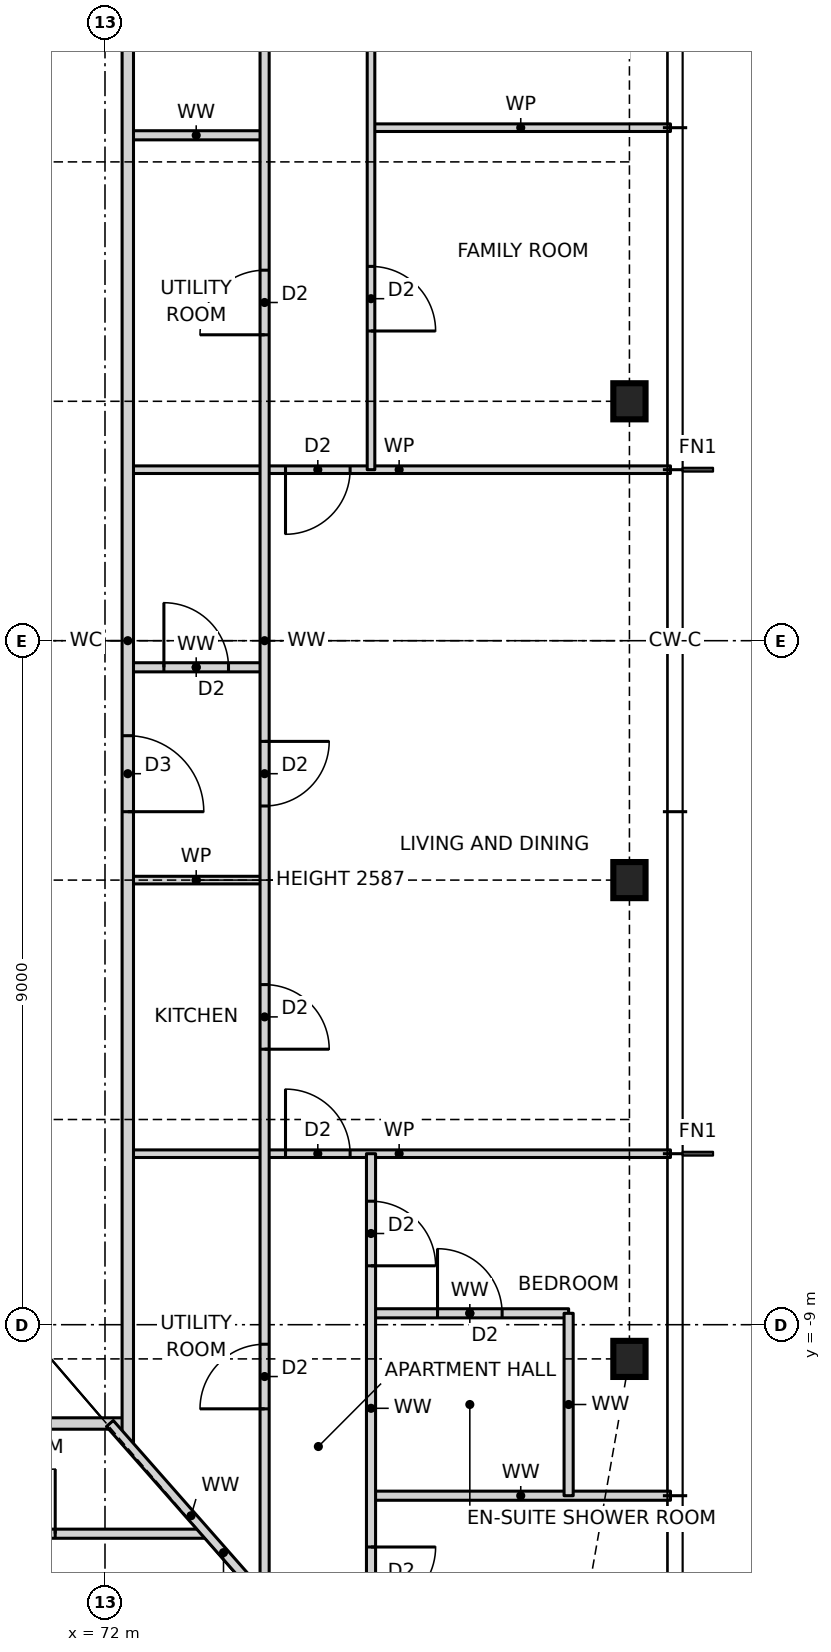
"""IFC4 building model, lengths in metres.
Left out: names, types, materials, properties, quantities, classifications, styles, units other than length and angle.
Written with IfcOpenShell. Run it as: python <this file> out.ifc"""

import sys

from ifc_helpers import new_model, si_unit, direction, frame, frame_2d, origin, origin_2d, place, context, subcontext, project, spatial, rectangle, i_section, extrude, element, fill, save


model = new_model("IFC4")
c1 = context("Model", 3, precision=1e-05, world=origin(), true_north=direction((0.0, 1.0)))
c2 = subcontext(c1, "Body", "Model", "MODEL_VIEW")
j1 = project(units=[si_unit("LENGTHUNIT", "METRE"), si_unit("PLANEANGLEUNIT", "RADIAN")], contexts=[c1])
p1 = place(None, origin())
s1 = spatial("IfcSite", under=j1, at=p1, CompositionType="ELEMENT")
p2 = place(p1, origin())
s2 = spatial("IfcBuilding", under=s1, at=p2, CompositionType="ELEMENT")
p3 = place(p2, frame((0.0, 0.0, 25.5)))
s3 = spatial("IfcBuildingStorey", under=s2, at=p3, CompositionType="ELEMENT", Elevation=25.5)
for number, where, z_axis, x_axis in (
    (1, (78.9, -9.45, 0.0), (0.0, 0.0, 1.0), (1.0, 0.0, 0.0)),
    (2, (78.9, -3.15, 0.0), (0.0, 0.0, 1.0), (1.0, 0.0, 0.0)),
    (3, (78.9, 3.15, 0.0), (0.0, 0.0, 1.0), (1.0, 0.0, 0.0)),
):
    element("IfcColumn", number, at=place(p3, frame(where, z_axis=z_axis, x_axis=x_axis)), inside=s3, PredefinedType="COLUMN", context=c2, shape_type="SweptSolid", body=[
        extrude(i_section(OverallWidth=0.424, OverallDepth=0.475, WebThickness=0.048, FlangeThickness=0.077, at=origin_2d()), origin(), (0.0, 0.0, 1.0), 3.5),
    ])
p4 = place(p3, frame((54.0, -11.75, 0.0), z_axis=(0.0, 0.0, 1.0), x_axis=(1.0, 0.0, 0.0)))
e4 = element("IfcWall", 4, at=p4, inside=s3, PredefinedType="PARTITIONING", context=c2, shape_type="SweptSolid", body=[
    extrude(rectangle(XDim=19.34, YDim=0.12, at=frame_2d((9.67, 0.0))), origin(), (0.0, 0.0, 1.0), 3.27),
])
p5 = place(p4, frame((1.375, 0.0, 0.0)))
e5 = element("IfcOpeningElement", 5, at=p5, cuts=e4, PredefinedType="OPENING", context=c2, shape_type="SweptSolid", body=[
    extrude(rectangle(XDim=0.85, YDim=2.1, at=frame_2d((0.425, 1.05))), frame((0.0, 0.07, 0.0), z_axis=(0.0, -1.0, 0.0), x_axis=(1.0, 0.0, 0.0)), (0.0, 0.0, 1.0), 0.14),
])
p6 = place(p4, frame((4.575, 0.0, 0.0)))
e6 = element("IfcOpeningElement", 6, at=p6, cuts=e4, PredefinedType="OPENING", context=c2, shape_type="SweptSolid", body=[
    extrude(rectangle(XDim=0.85, YDim=2.1, at=frame_2d((0.425, 1.05))), frame((0.0, 0.07, 0.0), z_axis=(0.0, -1.0, 0.0), x_axis=(1.0, 0.0, 0.0)), (0.0, 0.0, 1.0), 0.14),
])
p7 = place(p4, frame((11.325, 0.0, 0.0)))
e7 = element("IfcOpeningElement", 7, at=p7, cuts=e4, PredefinedType="OPENING", context=c2, shape_type="SweptSolid", body=[
    extrude(rectangle(XDim=0.85, YDim=2.1, at=frame_2d((0.425, 1.05))), frame((0.0, 0.07, 0.0), z_axis=(0.0, -1.0, 0.0), x_axis=(1.0, 0.0, 0.0)), (0.0, 0.0, 1.0), 0.14),
])
p8 = place(p4, frame((16.495, 0.0, 0.0)))
e8 = element("IfcOpeningElement", 8, at=p8, cuts=e4, PredefinedType="OPENING", context=c2, shape_type="SweptSolid", body=[
    extrude(rectangle(XDim=0.85, YDim=2.1, at=frame_2d((0.425, 1.05))), frame((0.0, 0.07, 0.0), z_axis=(0.0, -1.0, 0.0), x_axis=(1.0, 0.0, 0.0)), (0.0, 0.0, 1.0), 0.14),
])
p9 = place(p3, frame((75.5, -11.25, 0.0), z_axis=(0.0, 0.0, 1.0), x_axis=(1.0, 0.0, 0.0)))
e9 = element("IfcWall", 9, at=p9, inside=s3, PredefinedType="PARTITIONING", context=c2, shape_type="SweptSolid", body=[
    extrude(rectangle(XDim=3.94, YDim=0.12, at=frame_2d((1.97, 0.0))), origin(), (0.0, 0.0, 1.0), 3.27),
])
p10 = place(p3, frame((53.7, -10.3, 0.0), z_axis=(0.0, 0.0, 1.0), x_axis=(1.0, 0.0, 0.0)))
e10 = element("IfcWall", 10, at=p10, inside=s3, PredefinedType="PARTITIONING", context=c2, shape_type="SweptSolid", body=[
    extrude(rectangle(XDim=18.6, YDim=0.15, at=frame_2d((9.3, 0.0))), origin(), (0.0, 0.0, 1.0), 3.27),
])
p11 = place(p10, frame((4.8, 0.0, 0.0)))
e11 = element("IfcOpeningElement", 11, at=p11, cuts=e10, PredefinedType="OPENING", context=c2, shape_type="SweptSolid", body=[
    extrude(rectangle(XDim=1.0, YDim=2.1, at=frame_2d((0.5, 1.05))), frame((0.0, 0.085, 0.0), z_axis=(0.0, -1.0, 0.0), x_axis=(1.0, 0.0, 0.0)), (0.0, 0.0, 1.0), 0.17),
])
p12 = place(p3, frame((75.5, -8.85, 0.0), z_axis=(0.0, 0.0, 1.0), x_axis=(1.0, 0.0, 0.0)))
e12 = element("IfcWall", 12, at=p12, inside=s3, PredefinedType="PARTITIONING", context=c2, shape_type="SweptSolid", body=[
    extrude(rectangle(XDim=2.6, YDim=0.12, at=frame_2d((1.3, 0.0))), origin(), (0.0, 0.0, 1.0), 3.27),
])
p13 = place(p12, frame((0.875, 0.0, 0.0)))
e13 = element("IfcOpeningElement", 13, at=p13, cuts=e12, PredefinedType="OPENING", context=c2, shape_type="SweptSolid", body=[
    extrude(rectangle(XDim=0.85, YDim=2.1, at=frame_2d((0.425, 1.05))), frame((0.0, 0.07, 0.0), z_axis=(0.0, -1.0, 0.0), x_axis=(1.0, 0.0, 0.0)), (0.0, 0.0, 1.0), 0.14),
])
p14 = place(p3, frame((72.3, -6.75, 0.0), z_axis=(0.0, 0.0, 1.0), x_axis=(1.0, 0.0, 0.0)))
e14 = element("IfcWall", 14, at=p14, inside=s3, PredefinedType="PARTITIONING", context=c2, shape_type="SweptSolid", body=[
    extrude(rectangle(XDim=7.14, YDim=0.1, at=frame_2d((3.57, 0.0))), origin(), (0.0, 0.0, 1.0), 3.27),
])
p15 = place(p14, frame((2.075, 0.0, 0.0)))
e15 = element("IfcOpeningElement", 15, at=p15, cuts=e14, PredefinedType="OPENING", context=c2, shape_type="SweptSolid", body=[
    extrude(rectangle(XDim=0.85, YDim=2.1, at=frame_2d((0.425, 1.05))), frame((0.0, 0.06, 0.0), z_axis=(0.0, -1.0, 0.0), x_axis=(1.0, 0.0, 0.0)), (0.0, 0.0, 1.0), 0.12),
])
p16 = place(p3, frame((72.3, -3.15, 0.0), z_axis=(0.0, 0.0, 1.0), x_axis=(1.0, 0.0, 0.0)))
e16 = element("IfcWall", 16, at=p16, inside=s3, PredefinedType="PARTITIONING", context=c2, shape_type="SweptSolid", body=[
    extrude(rectangle(XDim=1.8, YDim=0.1, at=frame_2d((0.9, 0.0))), origin(), (0.0, 0.0, 1.0), 2.587),
])
p17 = place(p3, frame((72.3, -0.35, 0.0), z_axis=(0.0, 0.0, 1.0), x_axis=(1.0, 0.0, 0.0)))
e17 = element("IfcWall", 17, at=p17, inside=s3, PredefinedType="PARTITIONING", context=c2, shape_type="SweptSolid", body=[
    extrude(rectangle(XDim=1.8, YDim=0.12, at=frame_2d((0.9, 0.0))), origin(), (0.0, 0.0, 1.0), 3.27),
])
p18 = place(p17, frame((0.475, 0.0, 0.0)))
e18 = element("IfcOpeningElement", 18, at=p18, cuts=e17, PredefinedType="OPENING", context=c2, shape_type="SweptSolid", body=[
    extrude(rectangle(XDim=0.85, YDim=2.1, at=frame_2d((0.425, 1.05))), frame((0.0, 0.07, 0.0), z_axis=(0.0, -1.0, 0.0), x_axis=(1.0, 0.0, 0.0)), (0.0, 0.0, 1.0), 0.14),
])
p19 = place(p3, frame((72.3, 2.25, 0.0), z_axis=(0.0, 0.0, 1.0), x_axis=(1.0, 0.0, 0.0)))
e19 = element("IfcWall", 19, at=p19, inside=s3, PredefinedType="PARTITIONING", context=c2, shape_type="SweptSolid", body=[
    extrude(rectangle(XDim=7.14, YDim=0.1, at=frame_2d((3.57, 0.0))), origin(), (0.0, 0.0, 1.0), 3.27),
])
p20 = place(p19, frame((2.075, 0.0, 0.0)))
e20 = element("IfcOpeningElement", 20, at=p20, cuts=e19, PredefinedType="OPENING", context=c2, shape_type="SweptSolid", body=[
    extrude(rectangle(XDim=0.85, YDim=2.1, at=frame_2d((0.425, 1.05))), frame((0.0, 0.06, 0.0), z_axis=(0.0, -1.0, 0.0), x_axis=(1.0, 0.0, 0.0)), (0.0, 0.0, 1.0), 0.12),
])
p21 = place(p3, frame((72.3, 6.65, 0.0), z_axis=(0.0, 0.0, 1.0), x_axis=(1.0, 0.0, 0.0)))
e21 = element("IfcWall", 21, at=p21, inside=s3, PredefinedType="PARTITIONING", context=c2, shape_type="SweptSolid", body=[
    extrude(rectangle(XDim=1.8, YDim=0.12, at=frame_2d((0.9, 0.0))), origin(), (0.0, 0.0, 1.0), 3.27),
])
p22 = place(p3, frame((75.5, 6.75, 0.0), z_axis=(0.0, 0.0, 1.0), x_axis=(1.0, 0.0, 0.0)))
e22 = element("IfcWall", 22, at=p22, inside=s3, PredefinedType="PARTITIONING", context=c2, shape_type="SweptSolid", body=[
    extrude(rectangle(XDim=3.94, YDim=0.1, at=frame_2d((1.97, 0.0))), origin(), (0.0, 0.0, 1.0), 3.27),
])
p23 = place(p3, frame((78.1, -11.25, 0.0), z_axis=(0.0, 0.0, 1.0), x_axis=(0.0, 1.0, 0.0)))
e23 = element("IfcWall", 23, at=p23, inside=s3, PredefinedType="PARTITIONING", context=c2, shape_type="SweptSolid", body=[
    extrude(rectangle(XDim=2.4, YDim=0.12, at=frame_2d((1.2, 0.0))), origin(), (0.0, 0.0, 1.0), 3.27),
])
p24 = place(p3, frame((75.5, -13.45, 0.0), z_axis=(0.0, 0.0, 1.0), x_axis=(0.0, 1.0, 0.0)))
e24 = element("IfcWall", 24, at=p24, inside=s3, PredefinedType="PARTITIONING", context=c2, shape_type="SweptSolid", body=[
    extrude(rectangle(XDim=6.7, YDim=0.12, at=frame_2d((3.35, 0.0))), origin(), (0.0, 0.0, 1.0), 3.27),
])
p25 = place(p24, frame((5.225, 0.0, 0.0)))
e25 = element("IfcOpeningElement", 25, at=p25, cuts=e24, PredefinedType="OPENING", context=c2, shape_type="SweptSolid", body=[
    extrude(rectangle(XDim=0.85, YDim=2.1, at=frame_2d((0.425, 1.05))), frame((0.0, 0.07, 0.0), z_axis=(0.0, -1.0, 0.0), x_axis=(1.0, 0.0, 0.0)), (0.0, 0.0, 1.0), 0.14),
])
p26 = place(p24, frame((0.675, 0.0, 0.0)))
e26 = element("IfcOpeningElement", 26, at=p26, cuts=e24, PredefinedType="OPENING", context=c2, shape_type="SweptSolid", body=[
    extrude(rectangle(XDim=0.85, YDim=2.1, at=frame_2d((0.425, 1.05))), frame((0.0, 0.07, 0.0), z_axis=(0.0, -1.0, 0.0), x_axis=(1.0, 0.0, 0.0)), (0.0, 0.0, 1.0), 0.14),
])
p27 = place(p3, frame((75.5, 2.25, 0.0), z_axis=(0.0, 0.0, 1.0), x_axis=(0.0, 1.0, 0.0)))
e27 = element("IfcWall", 27, at=p27, inside=s3, PredefinedType="PARTITIONING", context=c2, shape_type="SweptSolid", body=[
    extrude(rectangle(XDim=11.2, YDim=0.1, at=frame_2d((5.6, 0.0))), origin(), (0.0, 0.0, 1.0), 3.27),
])
p28 = place(p27, frame((1.825, 0.0, 0.0)))
e28 = element("IfcOpeningElement", 28, at=p28, cuts=e27, PredefinedType="OPENING", context=c2, shape_type="SweptSolid", body=[
    extrude(rectangle(XDim=0.85, YDim=2.1, at=frame_2d((0.425, 1.05))), frame((0.0, 0.06, 0.0), z_axis=(0.0, -1.0, 0.0), x_axis=(1.0, 0.0, 0.0)), (0.0, 0.0, 1.0), 0.12),
])
p29 = place(p27, frame((6.325, 0.0, 0.0)))
e29 = element("IfcOpeningElement", 29, at=p29, cuts=e27, PredefinedType="OPENING", context=c2, shape_type="SweptSolid", body=[
    extrude(rectangle(XDim=0.85, YDim=2.1, at=frame_2d((0.425, 1.05))), frame((0.0, 0.06, 0.0), z_axis=(0.0, -1.0, 0.0), x_axis=(1.0, 0.0, 0.0)), (0.0, 0.0, 1.0), 0.12),
])
p30 = place(p27, frame((9.675, 0.0, 0.0)))
e30 = element("IfcOpeningElement", 30, at=p30, cuts=e27, PredefinedType="OPENING", context=c2, shape_type="SweptSolid", body=[
    extrude(rectangle(XDim=0.85, YDim=2.1, at=frame_2d((0.425, 1.05))), frame((0.0, 0.06, 0.0), z_axis=(0.0, -1.0, 0.0), x_axis=(1.0, 0.0, 0.0)), (0.0, 0.0, 1.0), 0.12),
])
p31 = place(p3, frame((74.1, -12.614, 0.0), z_axis=(0.0, 0.0, 1.0), x_axis=(0.0, 1.0, 0.0)))
e31 = element("IfcWall", 31, at=p31, inside=s3, PredefinedType="PARTITIONING", context=c2, shape_type="SweptSolid", body=[
    extrude(rectangle(XDim=25.228, YDim=0.12, at=frame_2d((12.614, 0.0))), origin(), (0.0, 0.0, 1.0), 3.27),
])
p32 = place(p31, frame((7.239, 0.0, 0.0)))
e32 = element("IfcOpeningElement", 32, at=p32, cuts=e31, PredefinedType="OPENING", context=c2, shape_type="SweptSolid", body=[
    extrude(rectangle(XDim=0.85, YDim=2.1, at=frame_2d((0.425, 1.05))), frame((0.0, 0.07, 0.0), z_axis=(0.0, -1.0, 0.0), x_axis=(1.0, 0.0, 0.0)), (0.0, 0.0, 1.0), 0.14),
])
p33 = place(p31, frame((10.439, 0.0, 0.0)))
e33 = element("IfcOpeningElement", 33, at=p33, cuts=e31, PredefinedType="OPENING", context=c2, shape_type="SweptSolid", body=[
    extrude(rectangle(XDim=0.85, YDim=2.1, at=frame_2d((0.425, 1.05))), frame((0.0, 0.07, 0.0), z_axis=(0.0, -1.0, 0.0), x_axis=(1.0, 0.0, 0.0)), (0.0, 0.0, 1.0), 0.14),
])
p34 = place(p31, frame((2.507, 0.0, 0.0)))
e34 = element("IfcOpeningElement", 34, at=p34, cuts=e31, PredefinedType="OPENING", context=c2, shape_type="SweptSolid", body=[
    extrude(rectangle(XDim=0.85, YDim=2.1, at=frame_2d((0.425, 1.05))), frame((0.0, 0.07, 0.0), z_axis=(0.0, -1.0, 0.0), x_axis=(1.0, 0.0, 0.0)), (0.0, 0.0, 1.0), 0.14),
])
p35 = place(p31, frame((16.639, 0.0, 0.0)))
e35 = element("IfcOpeningElement", 35, at=p35, cuts=e31, PredefinedType="OPENING", context=c2, shape_type="SweptSolid", body=[
    extrude(rectangle(XDim=0.85, YDim=2.1, at=frame_2d((0.425, 1.05))), frame((0.0, 0.07, 0.0), z_axis=(0.0, -1.0, 0.0), x_axis=(1.0, 0.0, 0.0)), (0.0, 0.0, 1.0), 0.14),
])
p36 = place(p31, frame((21.821, 0.0, 0.0)))
e36 = element("IfcOpeningElement", 36, at=p36, cuts=e31, PredefinedType="OPENING", context=c2, shape_type="SweptSolid", body=[
    extrude(rectangle(XDim=0.85, YDim=2.1, at=frame_2d((0.425, 1.05))), frame((0.0, 0.07, 0.0), z_axis=(0.0, -1.0, 0.0), x_axis=(1.0, 0.0, 0.0)), (0.0, 0.0, 1.0), 0.14),
])
p37 = place(p3, frame((72.3, -10.568, 0.0), z_axis=(0.0, 0.0, 1.0), x_axis=(0.0, 1.0, 0.0)))
e37 = element("IfcWall", 37, at=p37, inside=s3, PredefinedType="PARTITIONING", context=c2, shape_type="SweptSolid", body=[
    extrude(rectangle(XDim=21.136, YDim=0.15, at=frame_2d((10.568, 0.0))), origin(), (0.0, 0.0, 1.0), 3.27),
])
p38 = place(p37, frame((8.318, 0.0, 0.0)))
e38 = element("IfcOpeningElement", 38, at=p38, cuts=e37, PredefinedType="OPENING", context=c2, shape_type="SweptSolid", body=[
    extrude(rectangle(XDim=1.0, YDim=2.1, at=frame_2d((0.5, 1.05))), frame((0.0, 0.085, 0.0), z_axis=(0.0, -1.0, 0.0), x_axis=(1.0, 0.0, 0.0)), (0.0, 0.0, 1.0), 0.17),
])
p39 = place(p3, frame((74.2, -12.727, 0.0), z_axis=(0.0, 0.0, 1.0), x_axis=(-0.660667046586, 0.75067906162, 0.0)))
e39 = element("IfcWall", 39, at=p39, inside=s3, PredefinedType="PARTITIONING", context=c2, shape_type="SweptSolid", body=[
    extrude(rectangle(XDim=3.233, YDim=0.12, at=frame_2d((1.617, 0.0))), origin(), (0.0, 0.0, 1.0), 2.429),
])
p40 = place(p8, origin())
e40 = element("IfcDoor", 40, at=p40, inside=s3, OperationType="SINGLE_SWING_RIGHT", PredefinedType="DOOR", context=c2, shape_type="SweptSolid", body=[
    extrude(rectangle(XDim=0.85, YDim=2.1, at=frame_2d((0.425, 1.05))), frame((0.0, 0.025, 0.0), z_axis=(0.0, -1.0, 0.0), x_axis=(1.0, 0.0, 0.0)), (0.0, 0.0, 1.0), 0.05),
])
fill(e8, e40)
p41 = place(p32, frame((0.85, 0.0, 0.0), z_axis=(0.0, 0.0, 1.0), x_axis=(-1.0, 0.0, 0.0)))
e41 = element("IfcDoor", 41, at=p41, inside=s3, OperationType="SINGLE_SWING_RIGHT", PredefinedType="DOOR", context=c2, shape_type="SweptSolid", body=[
    extrude(rectangle(XDim=0.85, YDim=2.1, at=frame_2d((0.425, 1.05))), frame((0.0, 0.025, 0.0), z_axis=(0.0, -1.0, 0.0), x_axis=(1.0, 0.0, 0.0)), (0.0, 0.0, 1.0), 0.05),
])
fill(e32, e41)
p42 = place(p38, frame((1.0, 0.0, 0.0), z_axis=(0.0, 0.0, 1.0), x_axis=(-1.0, 0.0, 0.0)))
e42 = element("IfcDoor", 42, at=p42, inside=s3, OperationType="SINGLE_SWING_RIGHT", PredefinedType="DOOR", context=c2, shape_type="SweptSolid", body=[
    extrude(rectangle(XDim=1.0, YDim=2.1, at=frame_2d((0.5, 1.05))), frame((0.0, 0.025, 0.0), z_axis=(0.0, -1.0, 0.0), x_axis=(1.0, 0.0, 0.0)), (0.0, 0.0, 1.0), 0.05),
])
fill(e38, e42)
p43 = place(p33, frame((0.85, 0.0, 0.0), z_axis=(0.0, 0.0, 1.0), x_axis=(-1.0, 0.0, 0.0)))
e43 = element("IfcDoor", 43, at=p43, inside=s3, OperationType="SINGLE_SWING_LEFT", PredefinedType="DOOR", context=c2, shape_type="SweptSolid", body=[
    extrude(rectangle(XDim=0.85, YDim=2.1, at=frame_2d((0.425, 1.05))), frame((0.0, 0.025, 0.0), z_axis=(0.0, -1.0, 0.0), x_axis=(1.0, 0.0, 0.0)), (0.0, 0.0, 1.0), 0.05),
])
fill(e33, e43)
p44 = place(p18, origin())
e44 = element("IfcDoor", 44, at=p44, inside=s3, OperationType="SINGLE_SWING_LEFT", PredefinedType="DOOR", context=c2, shape_type="SweptSolid", body=[
    extrude(rectangle(XDim=0.85, YDim=2.1, at=frame_2d((0.425, 1.05))), frame((0.0, 0.025, 0.0), z_axis=(0.0, -1.0, 0.0), x_axis=(1.0, 0.0, 0.0)), (0.0, 0.0, 1.0), 0.05),
])
fill(e18, e44)
p45 = place(p15, origin())
e45 = element("IfcDoor", 45, at=p45, inside=s3, OperationType="SINGLE_SWING_LEFT", PredefinedType="DOOR", context=c2, shape_type="SweptSolid", body=[
    extrude(rectangle(XDim=0.85, YDim=2.1, at=frame_2d((0.425, 1.05))), frame((0.0, 0.025, 0.0), z_axis=(0.0, -1.0, 0.0), x_axis=(1.0, 0.0, 0.0)), (0.0, 0.0, 1.0), 0.05),
])
fill(e15, e45)
p46 = place(p13, origin())
e46 = element("IfcDoor", 46, at=p46, inside=s3, OperationType="SINGLE_SWING_LEFT", PredefinedType="DOOR", context=c2, shape_type="SweptSolid", body=[
    extrude(rectangle(XDim=0.85, YDim=2.1, at=frame_2d((0.425, 1.05))), frame((0.0, 0.025, 0.0), z_axis=(0.0, -1.0, 0.0), x_axis=(1.0, 0.0, 0.0)), (0.0, 0.0, 1.0), 0.05),
])
fill(e13, e46)
p47 = place(p25, frame((0.85, 0.0, 0.0), z_axis=(0.0, 0.0, 1.0), x_axis=(-1.0, 0.0, 0.0)))
e47 = element("IfcDoor", 47, at=p47, inside=s3, OperationType="SINGLE_SWING_RIGHT", PredefinedType="DOOR", context=c2, shape_type="SweptSolid", body=[
    extrude(rectangle(XDim=0.85, YDim=2.1, at=frame_2d((0.425, 1.05))), frame((0.0, 0.025, 0.0), z_axis=(0.0, -1.0, 0.0), x_axis=(1.0, 0.0, 0.0)), (0.0, 0.0, 1.0), 0.05),
])
fill(e25, e47)
p48 = place(p26, frame((0.85, 0.0, 0.0), z_axis=(0.0, 0.0, 1.0), x_axis=(-1.0, 0.0, 0.0)))
e48 = element("IfcDoor", 48, at=p48, inside=s3, OperationType="SINGLE_SWING_LEFT", PredefinedType="DOOR", context=c2, shape_type="SweptSolid", body=[
    extrude(rectangle(XDim=0.85, YDim=2.1, at=frame_2d((0.425, 1.05))), frame((0.0, 0.025, 0.0), z_axis=(0.0, -1.0, 0.0), x_axis=(1.0, 0.0, 0.0)), (0.0, 0.0, 1.0), 0.05),
])
fill(e26, e48)
p49 = place(p34, origin())
e49 = element("IfcDoor", 49, at=p49, inside=s3, OperationType="SINGLE_SWING_LEFT", PredefinedType="DOOR", context=c2, shape_type="SweptSolid", body=[
    extrude(rectangle(XDim=0.85, YDim=2.1, at=frame_2d((0.425, 1.05))), frame((0.0, 0.025, 0.0), z_axis=(0.0, -1.0, 0.0), x_axis=(1.0, 0.0, 0.0)), (0.0, 0.0, 1.0), 0.05),
])
fill(e34, e49)
p50 = place(p20, frame((0.85, 0.0, 0.0), z_axis=(0.0, 0.0, 1.0), x_axis=(-1.0, 0.0, 0.0)))
e50 = element("IfcDoor", 50, at=p50, inside=s3, OperationType="SINGLE_SWING_RIGHT", PredefinedType="DOOR", context=c2, shape_type="SweptSolid", body=[
    extrude(rectangle(XDim=0.85, YDim=2.1, at=frame_2d((0.425, 1.05))), frame((0.0, 0.025, 0.0), z_axis=(0.0, -1.0, 0.0), x_axis=(1.0, 0.0, 0.0)), (0.0, 0.0, 1.0), 0.05),
])
fill(e20, e50)
p51 = place(p28, frame((0.85, 0.0, 0.0), z_axis=(0.0, 0.0, 1.0), x_axis=(-1.0, 0.0, 0.0)))
e51 = element("IfcDoor", 51, at=p51, inside=s3, OperationType="SINGLE_SWING_RIGHT", PredefinedType="DOOR", context=c2, shape_type="SweptSolid", body=[
    extrude(rectangle(XDim=0.85, YDim=2.1, at=frame_2d((0.425, 1.05))), frame((0.0, 0.025, 0.0), z_axis=(0.0, -1.0, 0.0), x_axis=(1.0, 0.0, 0.0)), (0.0, 0.0, 1.0), 0.05),
])
fill(e28, e51)
p52 = place(p35, origin())
e52 = element("IfcDoor", 52, at=p52, inside=s3, OperationType="SINGLE_SWING_LEFT", PredefinedType="DOOR", context=c2, shape_type="SweptSolid", body=[
    extrude(rectangle(XDim=0.85, YDim=2.1, at=frame_2d((0.425, 1.05))), frame((0.0, 0.025, 0.0), z_axis=(0.0, -1.0, 0.0), x_axis=(1.0, 0.0, 0.0)), (0.0, 0.0, 1.0), 0.05),
])
fill(e35, e52)
save(model, sys.argv[1])
